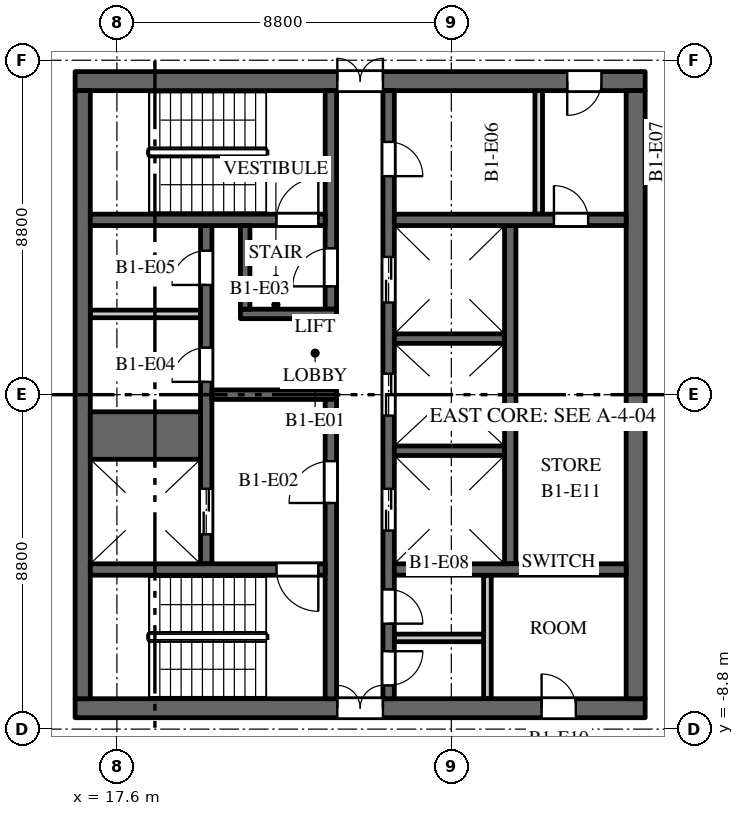
"""IFC4 building model, lengths in metres.
Left out: names, types, materials, properties, quantities, classifications, styles, units other than length and angle.
Written with IfcOpenShell. Run it as: python <this file> out.ifc"""

import sys

from ifc_helpers import new_model, si_unit, direction, frame, frame_2d, origin, place, context, subcontext, project, spatial, rectangle, extrude, element, fill, save


model = new_model("IFC4")
c1 = context("Model", 3, precision=1e-05, world=origin(), true_north=direction((0.0, 1.0)))
c2 = subcontext(c1, "Body", "Model", "MODEL_VIEW")
j1 = project(units=[si_unit("LENGTHUNIT", "METRE"), si_unit("PLANEANGLEUNIT", "RADIAN")], contexts=[c1])
p1 = place(None, origin())
s1 = spatial("IfcSite", under=j1, at=p1, CompositionType="ELEMENT")
p2 = place(p1, origin())
s2 = spatial("IfcBuilding", under=s1, at=p2, CompositionType="ELEMENT")
p3 = place(p2, frame((0.0, 0.0, -4.2)))
s3 = spatial("IfcBuildingStorey", under=s2, at=p3, CompositionType="ELEMENT", Elevation=-4.2)
p4 = place(p3, frame((16.5, 8.25, 0.0), z_axis=(0.0, 0.0, 1.0), x_axis=(1.0, 0.0, 0.0)))
e1 = element("IfcWall", 1, at=p4, inside=s3, PredefinedType="SHEAR", context=c2, shape_type="SweptSolid", body=[
    extrude(rectangle(XDim=15.0, YDim=0.5, at=frame_2d((7.5, 0.0))), origin(), (0.0, 0.0, 1.0), 3.85),
])
p5 = place(p4, frame((6.9, 0.0, 0.0)))
e2 = element("IfcOpeningElement", 2, at=p5, cuts=e1, PredefinedType="OPENING", context=c2, shape_type="SweptSolid", body=[
    extrude(rectangle(XDim=1.2, YDim=2.1, at=frame_2d((0.6, 1.05))), frame((0.0, 0.26, 0.0), z_axis=(0.0, -1.0, 0.0), x_axis=(1.0, 0.0, 0.0)), (0.0, 0.0, 1.0), 0.52),
])
p6 = place(p4, frame((12.95, 0.0, 0.0)))
e3 = element("IfcOpeningElement", 3, at=p6, cuts=e1, PredefinedType="OPENING", context=c2, shape_type="SweptSolid", body=[
    extrude(rectangle(XDim=0.9, YDim=2.1, at=frame_2d((0.45, 1.05))), frame((0.0, 0.26, 0.0), z_axis=(0.0, -1.0, 0.0), x_axis=(1.0, 0.0, 0.0)), (0.0, 0.0, 1.0), 0.52),
])
p7 = place(p3, frame((16.5, -8.25, 0.0), z_axis=(0.0, 0.0, 1.0), x_axis=(1.0, 0.0, 0.0)))
e4 = element("IfcWall", 4, at=p7, inside=s3, PredefinedType="SHEAR", context=c2, shape_type="SweptSolid", body=[
    extrude(rectangle(XDim=15.0, YDim=0.5, at=frame_2d((7.5, 0.0))), origin(), (0.0, 0.0, 1.0), 3.85),
])
p8 = place(p7, frame((6.9, 0.0, 0.0)))
e5 = element("IfcOpeningElement", 5, at=p8, cuts=e4, PredefinedType="OPENING", context=c2, shape_type="SweptSolid", body=[
    extrude(rectangle(XDim=1.2, YDim=2.1, at=frame_2d((0.6, 1.05))), frame((0.0, 0.26, 0.0), z_axis=(0.0, -1.0, 0.0), x_axis=(1.0, 0.0, 0.0)), (0.0, 0.0, 1.0), 0.52),
])
p9 = place(p7, frame((12.275, 0.0, 0.0)))
e6 = element("IfcOpeningElement", 6, at=p9, cuts=e4, PredefinedType="OPENING", context=c2, shape_type="SweptSolid", body=[
    extrude(rectangle(XDim=0.9, YDim=2.1, at=frame_2d((0.45, 1.05))), frame((0.0, 0.26, 0.0), z_axis=(0.0, -1.0, 0.0), x_axis=(1.0, 0.0, 0.0)), (0.0, 0.0, 1.0), 0.52),
])
p10 = place(p3, frame((16.9, 2.125, 0.0), z_axis=(0.0, 0.0, 1.0), x_axis=(1.0, 0.0, 0.0)))
e7 = element("IfcWall", 7, at=p10, inside=s3, PredefinedType="PARTITIONING", context=c2, shape_type="SweptSolid", body=[
    extrude(rectangle(XDim=2.9, YDim=0.2, at=frame_2d((1.45, 0.0))), origin(), (0.0, 0.0, 1.0), 3.85),
])
p11 = place(p3, frame((27.95, -4.45, 0.0), z_axis=(0.0, 0.0, 1.0), x_axis=(0.0, 1.0, 0.0)))
e8 = element("IfcWall", 8, at=p11, inside=s3, PredefinedType="SHEAR", context=c2, shape_type="SweptSolid", body=[
    extrude(rectangle(XDim=8.9, YDim=0.3, at=frame_2d((4.45, 0.0))), origin(), (0.0, 0.0, 1.0), 3.85),
])
p12 = place(p3, frame((19.95, -4.45, 0.0), z_axis=(0.0, 0.0, 1.0), x_axis=(0.0, 1.0, 0.0)))
e9 = element("IfcWall", 9, at=p12, inside=s3, PredefinedType="SHEAR", context=c2, shape_type="SweptSolid", body=[
    extrude(rectangle(XDim=8.9, YDim=0.3, at=frame_2d((4.45, 0.0))), origin(), (0.0, 0.0, 1.0), 3.85),
])
p13 = place(p12, frame((0.775, 0.0, 0.0)))
e10 = element("IfcOpeningElement", 10, at=p13, cuts=e9, PredefinedType="OPENING", context=c2, shape_type="SweptSolid", body=[
    extrude(rectangle(XDim=1.2, YDim=2.1, at=frame_2d((0.6, 1.05))), frame((0.0, 0.16, 0.0), z_axis=(0.0, -1.0, 0.0), x_axis=(1.0, 0.0, 0.0)), (0.0, 0.0, 1.0), 0.32),
])
p14 = place(p12, frame((4.788, 0.0, 0.0)))
e11 = element("IfcOpeningElement", 11, at=p14, cuts=e9, PredefinedType="OPENING", context=c2, shape_type="SweptSolid", body=[
    extrude(rectangle(XDim=0.9, YDim=2.1, at=frame_2d((0.45, 1.05))), frame((0.0, 0.16, 0.0), z_axis=(0.0, -1.0, 0.0), x_axis=(1.0, 0.0, 0.0)), (0.0, 0.0, 1.0), 0.32),
])
p15 = place(p12, frame((7.337, 0.0, 0.0)))
e12 = element("IfcOpeningElement", 12, at=p15, cuts=e9, PredefinedType="OPENING", context=c2, shape_type="SweptSolid", body=[
    extrude(rectangle(XDim=0.9, YDim=2.1, at=frame_2d((0.45, 1.05))), frame((0.0, 0.16, 0.0), z_axis=(0.0, -1.0, 0.0), x_axis=(1.0, 0.0, 0.0)), (0.0, 0.0, 1.0), 0.32),
])
p16 = place(p3, frame((24.75, -8.0, 0.0), z_axis=(0.0, 0.0, 1.0), x_axis=(0.0, 1.0, 0.0)))
e13 = element("IfcWall", 13, at=p16, inside=s3, PredefinedType="SHEAR", context=c2, shape_type="SweptSolid", body=[
    extrude(rectangle(XDim=16.0, YDim=0.3, at=frame_2d((8.0, 0.0))), origin(), (0.0, 0.0, 1.0), 3.85),
])
p17 = place(p16, frame((4.425, 0.0, 0.0)))
e14 = element("IfcOpeningElement", 14, at=p17, cuts=e13, PredefinedType="OPENING", context=c2, shape_type="SweptSolid", body=[
    extrude(rectangle(XDim=1.1, YDim=2.1, at=frame_2d((0.55, 1.05))), frame((0.0, 0.16, 0.0), z_axis=(0.0, -1.0, 0.0), x_axis=(1.0, 0.0, 0.0)), (0.0, 0.0, 1.0), 0.32),
])
p18 = place(p16, frame((7.45, 0.0, 0.0)))
e15 = element("IfcOpeningElement", 15, at=p18, cuts=e13, PredefinedType="OPENING", context=c2, shape_type="SweptSolid", body=[
    extrude(rectangle(XDim=1.1, YDim=2.1, at=frame_2d((0.55, 1.05))), frame((0.0, 0.16, 0.0), z_axis=(0.0, -1.0, 0.0), x_axis=(1.0, 0.0, 0.0)), (0.0, 0.0, 1.0), 0.32),
])
p19 = place(p16, frame((10.425, 0.0, 0.0)))
e16 = element("IfcOpeningElement", 16, at=p19, cuts=e13, PredefinedType="OPENING", context=c2, shape_type="SweptSolid", body=[
    extrude(rectangle(XDim=1.2, YDim=2.1, at=frame_2d((0.6, 1.05))), frame((0.0, 0.16, 0.0), z_axis=(0.0, -1.0, 0.0), x_axis=(1.0, 0.0, 0.0)), (0.0, 0.0, 1.0), 0.32),
])
p20 = place(p16, frame((13.75, 0.0, 0.0)))
e17 = element("IfcOpeningElement", 17, at=p20, cuts=e13, PredefinedType="OPENING", context=c2, shape_type="SweptSolid", body=[
    extrude(rectangle(XDim=0.9, YDim=2.1, at=frame_2d((0.45, 1.05))), frame((0.0, 0.16, 0.0), z_axis=(0.0, -1.0, 0.0), x_axis=(1.0, 0.0, 0.0)), (0.0, 0.0, 1.0), 0.32),
])
p21 = place(p16, frame((1.975, 0.0, 0.0)))
e18 = element("IfcOpeningElement", 18, at=p21, cuts=e13, PredefinedType="OPENING", context=c2, shape_type="SweptSolid", body=[
    extrude(rectangle(XDim=0.9, YDim=2.1, at=frame_2d((0.45, 1.05))), frame((0.0, 0.16, 0.0), z_axis=(0.0, -1.0, 0.0), x_axis=(1.0, 0.0, 0.0)), (0.0, 0.0, 1.0), 0.32),
])
p22 = place(p16, frame((0.35, 0.0, 0.0)))
e19 = element("IfcOpeningElement", 19, at=p22, cuts=e13, PredefinedType="OPENING", context=c2, shape_type="SweptSolid", body=[
    extrude(rectangle(XDim=0.9, YDim=2.1, at=frame_2d((0.45, 1.05))), frame((0.0, 0.16, 0.0), z_axis=(0.0, -1.0, 0.0), x_axis=(1.0, 0.0, 0.0)), (0.0, 0.0, 1.0), 0.32),
])
p23 = place(p3, frame((20.1, 0.0, 0.0), z_axis=(0.0, 0.0, 1.0), x_axis=(1.0, 0.0, 0.0)))
e20 = element("IfcWall", 20, at=p23, inside=s3, PredefinedType="SHEAR", context=c2, shape_type="SweptSolid", body=[
    extrude(rectangle(XDim=3.28, YDim=0.25, at=frame_2d((1.64, 0.0))), origin(), (0.0, 0.0, 1.0), 3.85),
])
p24 = place(p3, frame((16.7, -8.0, 0.0), z_axis=(0.0, 0.0, 1.0), x_axis=(0.0, 1.0, 0.0)))
e21 = element("IfcWall", 21, at=p24, inside=s3, PredefinedType="SHEAR", context=c2, shape_type="SweptSolid", body=[
    extrude(rectangle(XDim=16.0, YDim=0.4, at=frame_2d((8.0, 0.0))), origin(), (0.0, 0.0, 1.0), 3.85),
])
p25 = place(p3, frame((31.25, -8.0, 0.0), z_axis=(0.0, 0.0, 1.0), x_axis=(0.0, 1.0, 0.0)))
e22 = element("IfcWall", 22, at=p25, inside=s3, PredefinedType="SHEAR", context=c2, shape_type="SweptSolid", body=[
    extrude(rectangle(XDim=16.0, YDim=0.5, at=frame_2d((8.0, 0.0))), origin(), (0.0, 0.0, 1.0), 3.85),
])
p26 = place(p3, frame((24.9, 4.6, 0.0), z_axis=(0.0, 0.0, 1.0), x_axis=(1.0, 0.0, 0.0)))
e23 = element("IfcWall", 23, at=p26, inside=s3, PredefinedType="SHEAR", context=c2, shape_type="SweptSolid", body=[
    extrude(rectangle(XDim=6.1, YDim=0.3, at=frame_2d((3.05, 0.0))), origin(), (0.0, 0.0, 1.0), 3.85),
])
p27 = place(p26, frame((4.2, 0.0, 0.0)))
e24 = element("IfcOpeningElement", 24, at=p27, cuts=e23, PredefinedType="OPENING", context=c2, shape_type="SweptSolid", body=[
    extrude(rectangle(XDim=0.9, YDim=2.1, at=frame_2d((0.45, 1.05))), frame((0.0, 0.16, 0.0), z_axis=(0.0, -1.0, 0.0), x_axis=(1.0, 0.0, 0.0)), (0.0, 0.0, 1.0), 0.32),
])
for number, where, z_axis, x_axis in (
    (25, (28.7, 4.75, 0.0), (0.0, 0.0, 1.0), (0.0, 1.0, 0.0)),
    (26, (27.35, -8.0, 0.0), (0.0, 0.0, 1.0), (0.0, 1.0, 0.0)),
):
    element("IfcWall", number, at=place(p3, frame(where, z_axis=z_axis, x_axis=x_axis)), inside=s3, PredefinedType="PARTITIONING", context=c2, shape_type="SweptSolid", body=[
        extrude(rectangle(XDim=3.25, YDim=0.2, at=frame_2d((1.625, 0.0))), origin(), (0.0, 0.0, 1.0), 3.85),
    ])
p28 = place(p3, frame((24.9, -6.4, 0.0), z_axis=(0.0, 0.0, 1.0), x_axis=(1.0, 0.0, 0.0)))
e27 = element("IfcWall", 27, at=p28, inside=s3, PredefinedType="PARTITIONING", context=c2, shape_type="SweptSolid", body=[
    extrude(rectangle(XDim=2.35, YDim=0.2, at=frame_2d((1.175, 0.0))), origin(), (0.0, 0.0, 1.0), 3.85),
])
p29 = place(p3, frame((24.9, -4.6, 0.0), z_axis=(0.0, 0.0, 1.0), x_axis=(1.0, 0.0, 0.0)))
e28 = element("IfcWall", 28, at=p29, inside=s3, PredefinedType="SHEAR", context=c2, shape_type="SweptSolid", body=[
    extrude(rectangle(XDim=6.1, YDim=0.3, at=frame_2d((3.05, 0.0))), origin(), (0.0, 0.0, 1.0), 3.85),
])
p30 = place(p3, frame((16.9, -1.075, 0.0), z_axis=(0.0, 0.0, 1.0), x_axis=(1.0, 0.0, 0.0)))
e29 = element("IfcWall", 29, at=p30, inside=s3, PredefinedType="SHEAR", context=c2, shape_type="SweptSolid", body=[
    extrude(rectangle(XDim=2.9, YDim=1.25, at=frame_2d((1.45, 0.0))), origin(), (0.0, 0.0, 1.0), 3.85),
])
for number, where, z_axis, x_axis in (
    (30, (24.9, -1.475, 0.0), (0.0, 0.0, 1.0), (1.0, 0.0, 0.0)),
    (31, (24.9, 1.475, 0.0), (0.0, 0.0, 1.0), (1.0, 0.0, 0.0)),
):
    element("IfcWall", number, at=place(p3, frame(where, z_axis=z_axis, x_axis=x_axis)), inside=s3, PredefinedType="SHEAR", context=c2, shape_type="SweptSolid", body=[
        extrude(rectangle(XDim=2.9, YDim=0.25, at=frame_2d((1.45, 0.0))), origin(), (0.0, 0.0, 1.0), 3.85),
    ])
p31 = place(p3, frame((23.23, 2.25, 0.0), z_axis=(0.0, 0.0, 1.0), x_axis=(0.0, 1.0, 0.0)))
e32 = element("IfcWall", 32, at=p31, inside=s3, PredefinedType="SHEAR", context=c2, shape_type="SweptSolid", body=[
    extrude(rectangle(XDim=5.75, YDim=0.3, at=frame_2d((2.875, 0.0))), origin(), (0.0, 0.0, 1.0), 3.85),
])
p32 = place(p31, frame((0.6, 0.0, 0.0)))
e33 = element("IfcOpeningElement", 33, at=p32, cuts=e32, PredefinedType="OPENING", context=c2, shape_type="SweptSolid", body=[
    extrude(rectangle(XDim=1.0, YDim=2.1, at=frame_2d((0.5, 1.05))), frame((0.0, 0.16, 0.0), z_axis=(0.0, -1.0, 0.0), x_axis=(1.0, 0.0, 0.0)), (0.0, 0.0, 1.0), 0.32),
])
p33 = place(p3, frame((23.23, -8.0, 0.0), z_axis=(0.0, 0.0, 1.0), x_axis=(0.0, 1.0, 0.0)))
e34 = element("IfcWall", 34, at=p33, inside=s3, PredefinedType="SHEAR", context=c2, shape_type="SweptSolid", body=[
    extrude(rectangle(XDim=7.875, YDim=0.3, at=frame_2d((3.938, 0.0))), origin(), (0.0, 0.0, 1.0), 3.85),
])
p34 = place(p33, frame((5.15, 0.0, 0.0)))
e35 = element("IfcOpeningElement", 35, at=p34, cuts=e34, PredefinedType="OPENING", context=c2, shape_type="SweptSolid", body=[
    extrude(rectangle(XDim=1.1, YDim=2.1, at=frame_2d((0.55, 1.05))), frame((0.0, 0.16, 0.0), z_axis=(0.0, -1.0, 0.0), x_axis=(1.0, 0.0, 0.0)), (0.0, 0.0, 1.0), 0.32),
])
p35 = place(p3, frame((16.9, 4.6, 0.0), z_axis=(0.0, 0.0, 1.0), x_axis=(1.0, 0.0, 0.0)))
e36 = element("IfcWall", 36, at=p35, inside=s3, PredefinedType="SHEAR", context=c2, shape_type="SweptSolid", body=[
    extrude(rectangle(XDim=6.18, YDim=0.3, at=frame_2d((3.09, 0.0))), origin(), (0.0, 0.0, 1.0), 3.85),
])
p36 = place(p35, frame((4.9, 0.0, 0.0)))
e37 = element("IfcOpeningElement", 37, at=p36, cuts=e36, PredefinedType="OPENING", context=c2, shape_type="SweptSolid", body=[
    extrude(rectangle(XDim=1.1, YDim=2.1, at=frame_2d((0.55, 1.05))), frame((0.0, 0.16, 0.0), z_axis=(0.0, -1.0, 0.0), x_axis=(1.0, 0.0, 0.0)), (0.0, 0.0, 1.0), 0.32),
])
p37 = place(p3, frame((16.9, -4.6, 0.0), z_axis=(0.0, 0.0, 1.0), x_axis=(1.0, 0.0, 0.0)))
e38 = element("IfcWall", 38, at=p37, inside=s3, PredefinedType="SHEAR", context=c2, shape_type="SweptSolid", body=[
    extrude(rectangle(XDim=6.18, YDim=0.3, at=frame_2d((3.09, 0.0))), origin(), (0.0, 0.0, 1.0), 3.85),
])
p38 = place(p37, frame((4.9, 0.0, 0.0)))
e39 = element("IfcOpeningElement", 39, at=p38, cuts=e38, PredefinedType="OPENING", context=c2, shape_type="SweptSolid", body=[
    extrude(rectangle(XDim=1.1, YDim=2.1, at=frame_2d((0.55, 1.05))), frame((0.0, 0.16, 0.0), z_axis=(0.0, -1.0, 0.0), x_axis=(1.0, 0.0, 0.0)), (0.0, 0.0, 1.0), 0.32),
])
p39 = place(p3, frame((20.85, 2.125, 0.0), z_axis=(0.0, 0.0, 1.0), x_axis=(1.0, 0.0, 0.0)))
e40 = element("IfcWall", 40, at=p39, inside=s3, PredefinedType="SHEAR", context=c2, shape_type="SweptSolid", body=[
    extrude(rectangle(XDim=2.53, YDim=0.25, at=frame_2d((1.265, 0.0))), origin(), (0.0, 0.0, 1.0), 3.85),
])
p40 = place(p3, frame((20.975, 2.25, 0.0), z_axis=(0.0, 0.0, 1.0), x_axis=(0.0, 1.0, 0.0)))
e41 = element("IfcWall", 41, at=p40, inside=s3, PredefinedType="SHEAR", context=c2, shape_type="SweptSolid", body=[
    extrude(rectangle(XDim=2.2, YDim=0.25, at=frame_2d((1.1, 0.0))), origin(), (0.0, 0.0, 1.0), 3.85),
])
p41 = place(p3, frame((33.069, 8.062, 0.0), z_axis=(0.0, 0.0, 1.0), x_axis=(-0.462265314279, 0.886741664305, 0.0)))
e42 = element("IfcWall", 42, at=p41, inside=s3, PredefinedType="SOLIDWALL", context=c2, shape_type="SweptSolid", body=[
    extrude(rectangle(XDim=4.135, YDim=0.25, at=frame_2d((2.067, 0.0))), origin(), (0.0, 0.0, 1.0), 2.95),
])
p42 = place(p3, frame((31.157, -11.729, 0.0), z_axis=(0.0, 0.0, 1.0), x_axis=(0.462265314279, 0.886741664305, 0.0)))
e43 = element("IfcWall", 43, at=p42, inside=s3, PredefinedType="SOLIDWALL", context=c2, shape_type="SweptSolid", body=[
    extrude(rectangle(XDim=4.135, YDim=0.25, at=frame_2d((2.067, 0.0))), origin(), (0.0, 0.0, 1.0), 2.95),
])
p43 = place(p42, frame((1.467, 0.0, 0.0)))
e44 = element("IfcOpeningElement", 44, at=p43, cuts=e43, PredefinedType="OPENING", context=c2, shape_type="SweptSolid", body=[
    extrude(rectangle(XDim=1.2, YDim=2.1, at=frame_2d((0.6, 1.05))), frame((0.0, 0.135, 0.0), z_axis=(0.0, -1.0, 0.0), x_axis=(1.0, 0.0, 0.0)), (0.0, 0.0, 1.0), 0.27),
])
p44 = place(p13, origin())
e45 = element("IfcDoor", 45, at=p44, inside=s3, OperationType="DOUBLE_DOOR_SLIDING", PredefinedType="DOOR", context=c2, shape_type="SweptSolid", body=[
    extrude(rectangle(XDim=1.2, YDim=2.1, at=frame_2d((0.6, 1.05))), frame((0.0, 0.025, 0.0), z_axis=(0.0, -1.0, 0.0), x_axis=(1.0, 0.0, 0.0)), (0.0, 0.0, 1.0), 0.05),
])
fill(e10, e45)
p45 = place(p17, origin())
e46 = element("IfcDoor", 46, at=p45, inside=s3, OperationType="DOUBLE_DOOR_SLIDING", PredefinedType="DOOR", context=c2, shape_type="SweptSolid", body=[
    extrude(rectangle(XDim=1.1, YDim=2.1, at=frame_2d((0.55, 1.05))), frame((0.0, 0.025, 0.0), z_axis=(0.0, -1.0, 0.0), x_axis=(1.0, 0.0, 0.0)), (0.0, 0.0, 1.0), 0.05),
])
fill(e14, e46)
p46 = place(p18, origin())
e47 = element("IfcDoor", 47, at=p46, inside=s3, OperationType="DOUBLE_DOOR_SLIDING", PredefinedType="DOOR", context=c2, shape_type="SweptSolid", body=[
    extrude(rectangle(XDim=1.1, YDim=2.1, at=frame_2d((0.55, 1.05))), frame((0.0, 0.025, 0.0), z_axis=(0.0, -1.0, 0.0), x_axis=(1.0, 0.0, 0.0)), (0.0, 0.0, 1.0), 0.05),
])
fill(e15, e47)
p47 = place(p19, origin())
e48 = element("IfcDoor", 48, at=p47, inside=s3, OperationType="DOUBLE_DOOR_SLIDING", PredefinedType="DOOR", context=c2, shape_type="SweptSolid", body=[
    extrude(rectangle(XDim=1.2, YDim=2.1, at=frame_2d((0.6, 1.05))), frame((0.0, 0.025, 0.0), z_axis=(0.0, -1.0, 0.0), x_axis=(1.0, 0.0, 0.0)), (0.0, 0.0, 1.0), 0.05),
])
fill(e16, e48)
p48 = place(p36, origin())
e49 = element("IfcDoor", 49, at=p48, inside=s3, OperationType="SINGLE_SWING_LEFT", PredefinedType="DOOR", context=c2, shape_type="SweptSolid", body=[
    extrude(rectangle(XDim=1.1, YDim=2.1, at=frame_2d((0.55, 1.05))), frame((0.0, 0.025, 0.0), z_axis=(0.0, -1.0, 0.0), x_axis=(1.0, 0.0, 0.0)), (0.0, 0.0, 1.0), 0.05),
])
fill(e37, e49)
p49 = place(p38, origin())
e50 = element("IfcDoor", 50, at=p49, inside=s3, OperationType="SINGLE_SWING_RIGHT", PredefinedType="DOOR", context=c2, shape_type="SweptSolid", body=[
    extrude(rectangle(XDim=1.1, YDim=2.1, at=frame_2d((0.55, 1.05))), frame((0.0, 0.025, 0.0), z_axis=(0.0, -1.0, 0.0), x_axis=(1.0, 0.0, 0.0)), (0.0, 0.0, 1.0), 0.05),
])
fill(e39, e50)
p50 = place(p34, origin())
e51 = element("IfcDoor", 51, at=p50, inside=s3, OperationType="SINGLE_SWING_RIGHT", PredefinedType="DOOR", context=c2, shape_type="SweptSolid", body=[
    extrude(rectangle(XDim=1.1, YDim=2.1, at=frame_2d((0.55, 1.05))), frame((0.0, 0.025, 0.0), z_axis=(0.0, -1.0, 0.0), x_axis=(1.0, 0.0, 0.0)), (0.0, 0.0, 1.0), 0.05),
])
fill(e35, e51)
p51 = place(p32, origin())
e52 = element("IfcDoor", 52, at=p51, inside=s3, OperationType="SINGLE_SWING_RIGHT", PredefinedType="DOOR", context=c2, shape_type="SweptSolid", body=[
    extrude(rectangle(XDim=1.0, YDim=2.1, at=frame_2d((0.5, 1.05))), frame((0.0, 0.025, 0.0), z_axis=(0.0, -1.0, 0.0), x_axis=(1.0, 0.0, 0.0)), (0.0, 0.0, 1.0), 0.05),
])
fill(e33, e52)
p52 = place(p5, origin())
e53 = element("IfcDoor", 53, at=p52, inside=s3, OperationType="DOUBLE_DOOR_DOUBLE_SWING", PredefinedType="DOOR", context=c2, shape_type="SweptSolid", body=[
    extrude(rectangle(XDim=1.2, YDim=2.1, at=frame_2d((0.6, 1.05))), frame((0.0, 0.025, 0.0), z_axis=(0.0, -1.0, 0.0), x_axis=(1.0, 0.0, 0.0)), (0.0, 0.0, 1.0), 0.05),
])
fill(e2, e53)
p53 = place(p8, origin())
e54 = element("IfcDoor", 54, at=p53, inside=s3, OperationType="DOUBLE_DOOR_DOUBLE_SWING", PredefinedType="DOOR", context=c2, shape_type="SweptSolid", body=[
    extrude(rectangle(XDim=1.2, YDim=2.1, at=frame_2d((0.6, 1.05))), frame((0.0, 0.025, 0.0), z_axis=(0.0, -1.0, 0.0), x_axis=(1.0, 0.0, 0.0)), (0.0, 0.0, 1.0), 0.05),
])
fill(e5, e54)
p54 = place(p14, origin())
e55 = element("IfcDoor", 55, at=p54, inside=s3, OperationType="SINGLE_SWING_RIGHT", PredefinedType="DOOR", context=c2, shape_type="SweptSolid", body=[
    extrude(rectangle(XDim=0.9, YDim=2.1, at=frame_2d((0.45, 1.05))), frame((0.0, 0.025, 0.0), z_axis=(0.0, -1.0, 0.0), x_axis=(1.0, 0.0, 0.0)), (0.0, 0.0, 1.0), 0.05),
])
fill(e11, e55)
p55 = place(p15, origin())
e56 = element("IfcDoor", 56, at=p55, inside=s3, OperationType="SINGLE_SWING_RIGHT", PredefinedType="DOOR", context=c2, shape_type="SweptSolid", body=[
    extrude(rectangle(XDim=0.9, YDim=2.1, at=frame_2d((0.45, 1.05))), frame((0.0, 0.025, 0.0), z_axis=(0.0, -1.0, 0.0), x_axis=(1.0, 0.0, 0.0)), (0.0, 0.0, 1.0), 0.05),
])
fill(e12, e56)
p56 = place(p20, origin())
e57 = element("IfcDoor", 57, at=p56, inside=s3, OperationType="SINGLE_SWING_LEFT", PredefinedType="DOOR", context=c2, shape_type="SweptSolid", body=[
    extrude(rectangle(XDim=0.9, YDim=2.1, at=frame_2d((0.45, 1.05))), frame((0.0, 0.025, 0.0), z_axis=(0.0, -1.0, 0.0), x_axis=(1.0, 0.0, 0.0)), (0.0, 0.0, 1.0), 0.05),
])
fill(e17, e57)
p57 = place(p6, origin())
e58 = element("IfcDoor", 58, at=p57, inside=s3, OperationType="SINGLE_SWING_LEFT", PredefinedType="DOOR", context=c2, shape_type="SweptSolid", body=[
    extrude(rectangle(XDim=0.9, YDim=2.1, at=frame_2d((0.45, 1.05))), frame((0.0, 0.025, 0.0), z_axis=(0.0, -1.0, 0.0), x_axis=(1.0, 0.0, 0.0)), (0.0, 0.0, 1.0), 0.05),
])
fill(e3, e58)
p58 = place(p21, origin())
e59 = element("IfcDoor", 59, at=p58, inside=s3, OperationType="SINGLE_SWING_LEFT", PredefinedType="DOOR", context=c2, shape_type="SweptSolid", body=[
    extrude(rectangle(XDim=0.9, YDim=2.1, at=frame_2d((0.45, 1.05))), frame((0.0, 0.025, 0.0), z_axis=(0.0, -1.0, 0.0), x_axis=(1.0, 0.0, 0.0)), (0.0, 0.0, 1.0), 0.05),
])
fill(e18, e59)
p59 = place(p22, origin())
e60 = element("IfcDoor", 60, at=p59, inside=s3, OperationType="SINGLE_SWING_RIGHT", PredefinedType="DOOR", context=c2, shape_type="SweptSolid", body=[
    extrude(rectangle(XDim=0.9, YDim=2.1, at=frame_2d((0.45, 1.05))), frame((0.0, 0.025, 0.0), z_axis=(0.0, -1.0, 0.0), x_axis=(1.0, 0.0, 0.0)), (0.0, 0.0, 1.0), 0.05),
])
fill(e19, e60)
p60 = place(p9, origin())
e61 = element("IfcDoor", 61, at=p60, inside=s3, OperationType="SINGLE_SWING_RIGHT", PredefinedType="DOOR", context=c2, shape_type="SweptSolid", body=[
    extrude(rectangle(XDim=0.9, YDim=2.1, at=frame_2d((0.45, 1.05))), frame((0.0, 0.025, 0.0), z_axis=(0.0, -1.0, 0.0), x_axis=(1.0, 0.0, 0.0)), (0.0, 0.0, 1.0), 0.05),
])
fill(e6, e61)
p61 = place(p27, origin())
e62 = element("IfcDoor", 62, at=p61, inside=s3, OperationType="SINGLE_SWING_RIGHT", PredefinedType="DOOR", context=c2, shape_type="SweptSolid", body=[
    extrude(rectangle(XDim=0.9, YDim=2.1, at=frame_2d((0.45, 1.05))), frame((0.0, 0.025, 0.0), z_axis=(0.0, -1.0, 0.0), x_axis=(1.0, 0.0, 0.0)), (0.0, 0.0, 1.0), 0.05),
])
fill(e24, e62)
save(model, sys.argv[1])
